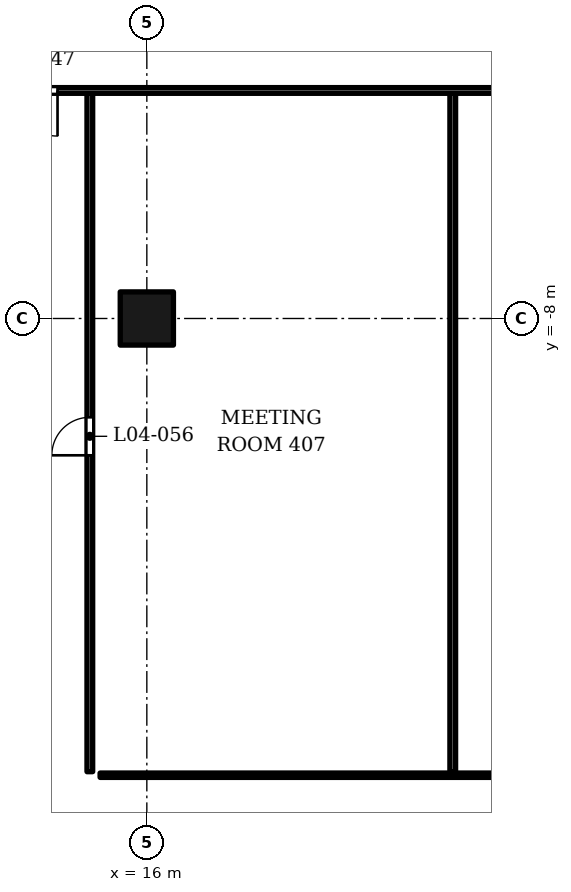
"""IFC4 building model, lengths in metres.
Left out: names, types, materials, properties, quantities, classifications, styles, units other than length and angle.
Written with IfcOpenShell. Run it as: python <this file> out.ifc"""

import sys

from ifc_helpers import new_model, si_unit, direction, frame, frame_2d, origin, origin_2d, place, context, subcontext, project, spatial, rectangle, extrude, element, fill, save


model = new_model("IFC4")
c1 = context("Model", 3, precision=1e-05, world=origin(), true_north=direction((0.0, 1.0)))
c2 = subcontext(c1, "Body", "Model", "MODEL_VIEW")
j1 = project(units=[si_unit("LENGTHUNIT", "METRE"), si_unit("PLANEANGLEUNIT", "RADIAN")], contexts=[c1])
p1 = place(None, origin())
s1 = spatial("IfcSite", under=j1, at=p1, CompositionType="ELEMENT")
p2 = place(p1, origin())
s2 = spatial("IfcBuilding", under=s1, at=p2, CompositionType="ELEMENT")
p3 = place(p2, frame((0.0, 0.0, 34.5)))
s3 = spatial("IfcBuildingStorey", under=s2, at=p3, CompositionType="ELEMENT", Elevation=34.5)
p4 = place(p3, frame((16.0, -8.0, 0.0), z_axis=(0.0, 0.0, 1.0), x_axis=(1.0, 0.0, 0.0)))
e1 = element("IfcColumn", 1, at=p4, inside=s3, PredefinedType="COLUMN", context=c2, shape_type="SweptSolid", body=[
    extrude(rectangle(XDim=1.4, YDim=1.4, at=origin_2d()), origin(), (0.0, 0.0, 1.0), 5.5),
])
p5 = place(p3, frame((14.77, -20.018, 0.0), z_axis=(0.0, 0.0, 1.0), x_axis=(1.0, 0.0, 0.0)))
e2 = element("IfcWall", 2, at=p5, inside=s3, PredefinedType="PARTITIONING", context=c2, shape_type="SweptSolid", body=[
    extrude(rectangle(XDim=18.905, YDim=0.115, at=frame_2d((9.453, 0.0))), origin(), (0.0, 0.0, 1.0), 3.85),
])
p6 = place(p5, frame((13.63, 0.0, 0.0)))
e3 = element("IfcOpeningElement", 3, at=p6, cuts=e2, PredefinedType="OPENING", context=c2, shape_type="SweptSolid", body=[
    extrude(rectangle(XDim=1.0, YDim=2.1, at=frame_2d((0.5, 1.05))), frame((0.0, 0.067, 0.0), z_axis=(0.0, -1.0, 0.0), x_axis=(1.0, 0.0, 0.0)), (0.0, 0.0, 1.0), 0.135),
])
p7 = place(p3, frame((14.5, -19.925, 0.0), z_axis=(0.0, 0.0, 1.0), x_axis=(0.0, 1.0, 0.0)))
e4 = element("IfcWall", 4, at=p7, inside=s3, PredefinedType="PARTITIONING", context=c2, shape_type="SweptSolid", body=[
    extrude(rectangle(XDim=17.85, YDim=0.15, at=frame_2d((8.925, 0.0))), origin(), (0.0, 0.0, 1.0), 3.85),
])
p8 = place(p7, frame((8.325, 0.0, 0.0)))
e5 = element("IfcOpeningElement", 5, at=p8, cuts=e4, PredefinedType="OPENING", context=c2, shape_type="SweptSolid", body=[
    extrude(rectangle(XDim=1.0, YDim=2.1, at=frame_2d((0.5, 1.05))), frame((0.0, 0.085, 0.0), z_axis=(0.0, -1.0, 0.0), x_axis=(1.0, 0.0, 0.0)), (0.0, 0.0, 1.0), 0.17),
])
p9 = place(p3, frame((24.05, -19.925, 0.0), z_axis=(0.0, 0.0, 1.0), x_axis=(0.0, 1.0, 0.0)))
e6 = element("IfcWall", 6, at=p9, inside=s3, PredefinedType="PARTITIONING", context=c2, shape_type="SweptSolid", body=[
    extrude(rectangle(XDim=17.85, YDim=0.15, at=frame_2d((8.925, 0.0))), origin(), (0.0, 0.0, 1.0), 3.85),
])
p10 = place(p3, frame((-33.46, -2.0, 0.0), z_axis=(0.0, 0.0, 1.0), x_axis=(1.0, 0.0, 0.0)))
e7 = element("IfcWall", 7, at=p10, inside=s3, PredefinedType="PARTITIONING", context=c2, shape_type="SweptSolid", body=[
    extrude(rectangle(XDim=66.92, YDim=0.15, at=frame_2d((33.46, 0.0))), origin(), (0.0, 0.0, 1.0), 3.85),
])
p11 = place(p10, frame((19.91, 0.0, 0.0)))
e8 = element("IfcOpeningElement", 8, at=p11, cuts=e7, PredefinedType="OPENING", context=c2, shape_type="SweptSolid", body=[
    extrude(rectangle(XDim=1.2, YDim=2.1, at=frame_2d((0.6, 1.05))), frame((0.0, 0.085, 0.0), z_axis=(0.0, -1.0, 0.0), x_axis=(1.0, 0.0, 0.0)), (0.0, 0.0, 1.0), 0.17),
])
p12 = place(p10, frame((45.91, 0.0, 0.0)))
e9 = element("IfcOpeningElement", 9, at=p12, cuts=e7, PredefinedType="OPENING", context=c2, shape_type="SweptSolid", body=[
    extrude(rectangle(XDim=1.2, YDim=2.1, at=frame_2d((0.6, 1.05))), frame((0.0, 0.085, 0.0), z_axis=(0.0, -1.0, 0.0), x_axis=(1.0, 0.0, 0.0)), (0.0, 0.0, 1.0), 0.17),
])
p13 = place(p10, frame((30.11, 0.0, 0.0)))
e10 = element("IfcOpeningElement", 10, at=p13, cuts=e7, PredefinedType="OPENING", context=c2, shape_type="SweptSolid", body=[
    extrude(rectangle(XDim=1.0, YDim=2.1, at=frame_2d((0.5, 1.05))), frame((0.0, 0.085, 0.0), z_axis=(0.0, -1.0, 0.0), x_axis=(1.0, 0.0, 0.0)), (0.0, 0.0, 1.0), 0.17),
])
p14 = place(p10, frame((35.86, 0.0, 0.0)))
e11 = element("IfcOpeningElement", 11, at=p14, cuts=e7, PredefinedType="OPENING", context=c2, shape_type="SweptSolid", body=[
    extrude(rectangle(XDim=1.0, YDim=2.1, at=frame_2d((0.5, 1.05))), frame((0.0, 0.085, 0.0), z_axis=(0.0, -1.0, 0.0), x_axis=(1.0, 0.0, 0.0)), (0.0, 0.0, 1.0), 0.17),
])
p15 = place(p12, origin())
e12 = element("IfcDoor", 12, at=p15, inside=s3, OperationType="SINGLE_SWING_RIGHT", PredefinedType="DOOR", context=c2, shape_type="SweptSolid", body=[
    extrude(rectangle(XDim=1.2, YDim=2.1, at=frame_2d((0.6, 1.05))), frame((0.0, 0.025, 0.0), z_axis=(0.0, -1.0, 0.0), x_axis=(1.0, 0.0, 0.0)), (0.0, 0.0, 1.0), 0.05),
])
fill(e9, e12)
p16 = place(p8, origin())
e13 = element("IfcDoor", 13, at=p16, inside=s3, OperationType="SINGLE_SWING_LEFT", PredefinedType="DOOR", context=c2, shape_type="SweptSolid", body=[
    extrude(rectangle(XDim=1.0, YDim=2.1, at=frame_2d((0.5, 1.05))), frame((0.0, 0.025, 0.0), z_axis=(0.0, -1.0, 0.0), x_axis=(1.0, 0.0, 0.0)), (0.0, 0.0, 1.0), 0.05),
])
fill(e5, e13)
save(model, sys.argv[1])
